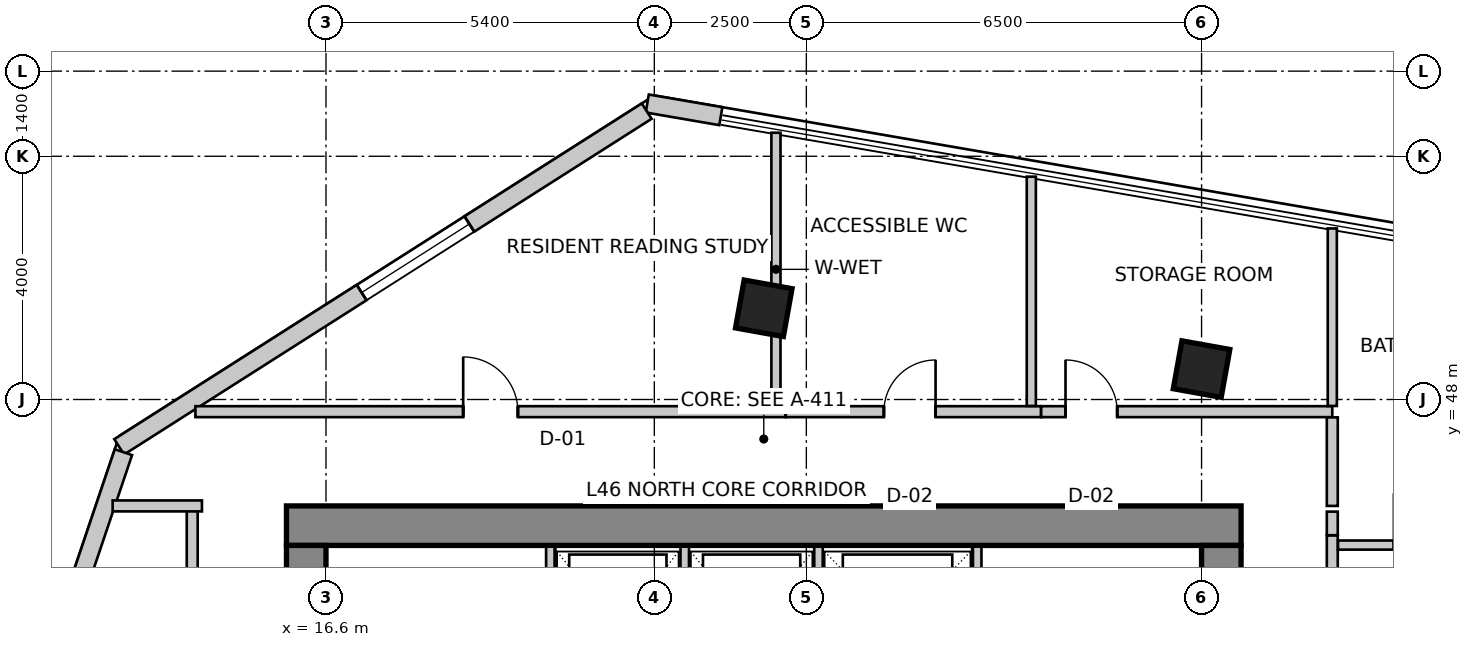
"""IFC4 building model, lengths in metres.
Left out: names, types, materials, properties, quantities, classifications, styles, units other than length and angle.
Written with IfcOpenShell. Run it as: python <this file> out.ifc"""

import sys

from ifc_helpers import new_model, si_unit, direction, frame, frame_2d, origin, origin_2d, place, context, subcontext, project, spatial, rectangle, extrude, source, transform, mapped, element, fill, save


model = new_model("IFC4")
c1 = context("Model", 3, precision=1e-05, world=origin(), true_north=direction((0.0, 1.0)))
c2 = subcontext(c1, "Body", "Model", "MODEL_VIEW")
j1 = project(units=[si_unit("LENGTHUNIT", "METRE"), si_unit("PLANEANGLEUNIT", "RADIAN")], contexts=[c1])
p1 = place(None, origin())
s1 = spatial("IfcSite", under=j1, at=p1, CompositionType="ELEMENT")
p2 = place(p1, origin())
s2 = spatial("IfcBuilding", under=s1, at=p2, CompositionType="ELEMENT")
p3 = place(p2, frame((0.0, 0.0, 186.9)))
s3 = spatial("IfcBuildingStorey", under=s2, at=p3, CompositionType="ELEMENT", Elevation=186.9)
p4 = place(p3, frame((15.95, 45.925, 0.0), z_axis=(0.0, 0.0, 1.0), x_axis=(1.0, 0.0, 0.0)))
e1 = element("IfcWall", 1, at=p4, inside=s3, PredefinedType="SHEAR", context=c2, shape_type="SweptSolid", body=[
    extrude(rectangle(XDim=15.7, YDim=0.65, at=frame_2d((7.85, 0.0))), origin(), (0.0, 0.0, 1.0), 3.5),
])
p5 = place(p3, frame((16.275, 34.2, 0.0), z_axis=(0.0, 0.0, 1.0), x_axis=(0.0, 1.0, 0.0)))
e2 = element("IfcWall", 2, at=p5, inside=s3, PredefinedType="SHEAR", context=c2, shape_type="SweptSolid", body=[
    extrude(rectangle(XDim=11.4, YDim=0.65, at=frame_2d((5.7, 0.0))), origin(), (0.0, 0.0, 1.0), 3.5),
])
m1 = source(origin(), c2, "Body", "SweptSolid", [
    extrude(rectangle(XDim=1.1, YDim=2.15, at=frame_2d((0.55, 1.075))), frame((0.0, 0.335, 0.0), z_axis=(0.0, -1.0, 0.0), x_axis=(1.0, 0.0, 0.0)), (0.0, 0.0, 1.0), 0.67),
])
p6 = place(p5, frame((7.15, 0.0, 0.0)))
e3 = element("IfcOpeningElement", 3, at=p6, cuts=e2, PredefinedType="OPENING", context=c2, shape_type="MappedRepresentation", body=[
    mapped(m1, transform((0.0, 0.0, 0.0), scale=1.0)),
])
p7 = place(p3, frame((31.325, 34.2, 0.0), z_axis=(0.0, 0.0, 1.0), x_axis=(0.0, 1.0, 0.0)))
e4 = element("IfcWall", 4, at=p7, inside=s3, PredefinedType="SHEAR", context=c2, shape_type="SweptSolid", body=[
    extrude(rectangle(XDim=11.4, YDim=0.65, at=frame_2d((5.7, 0.0))), origin(), (0.0, 0.0, 1.0), 3.5),
])
p8 = place(p7, frame((7.35, 0.0, 0.0)))
e5 = element("IfcOpeningElement", 5, at=p8, cuts=e4, PredefinedType="OPENING", context=c2, shape_type="MappedRepresentation", body=[
    mapped(m1, transform((0.0, 0.0, 0.0), scale=1.0)),
])
m2 = source(origin(), c2, "Body", "SweptSolid", [
    extrude(rectangle(XDim=0.8, YDim=0.8, at=origin_2d()), origin(), (0.0, 0.0, 1.0), 3.5),
])
for number, where, z_axis, x_axis in (
    (6, (23.8, 49.5, 0.0), (0.0, 0.0, 1.0), (0.984, -0.177, 0.0)),
    (7, (31.0, 48.5, 0.0), (0.0, 0.0, 1.0), (0.984, -0.177, 0.0)),
):
    element("IfcColumn", number, at=place(p3, frame(where, z_axis=z_axis, x_axis=x_axis)), inside=s3, PredefinedType="COLUMN", context=c2, shape_type="MappedRepresentation", body=[
        mapped(m2, transform((0.0, 0.0, 0.0), scale=1.0)),
    ])
p9 = place(p3, frame((23.094, 52.66, 0.0), z_axis=(0.0, 0.0, 1.0), x_axis=(-0.985503719785, 0.169653818966, 0.0)))
e8 = element("IfcWall", 8, at=p9, inside=s3, PredefinedType="SOLIDWALL", context=c2, shape_type="SweptSolid", body=[
    extrude(rectangle(XDim=1.228, YDim=0.3, at=frame_2d((0.614, 0.0))), origin(), (0.0, 0.0, 1.0), 3.25),
])
p10 = place(p3, frame((21.875, 52.742, 0.0), z_axis=(0.0, 0.0, 1.0), x_axis=(-0.843666375448, -0.536867811419, 0.0)))
e9 = element("IfcWall", 9, at=p10, inside=s3, PredefinedType="SOLIDWALL", context=c2, shape_type="SweptSolid", body=[
    extrude(rectangle(XDim=10.284, YDim=0.3, at=frame_2d((5.142, 0.0))), origin(), (0.0, 0.0, 1.0), 3.25),
])
m3 = source(origin(), c2, "Body", "SweptSolid", [
    extrude(rectangle(XDim=2.1, YDim=2.0, at=frame_2d((1.05, 1.0))), frame((0.0, 0.16, 0.0), z_axis=(0.0, -1.0, 0.0), x_axis=(1.0, 0.0, 0.0)), (0.0, 0.0, 1.0), 0.32),
])
p11 = place(p10, frame((3.457, 0.0, 0.85)))
e10 = element("IfcOpeningElement", 10, at=p11, cuts=e9, PredefinedType="OPENING", context=c2, shape_type="MappedRepresentation", body=[
    mapped(m3, transform((0.0, 0.0, 0.0), scale=1.0)),
])
p12 = place(p3, frame((13.269, 47.134, 0.0), z_axis=(0.0, 0.0, 1.0), x_axis=(-0.319920776449, -0.947444297464, 0.0)))
e11 = element("IfcWall", 11, at=p12, inside=s3, PredefinedType="SOLIDWALL", context=c2, shape_type="SweptSolid", body=[
    extrude(rectangle(XDim=16.133, YDim=0.3, at=frame_2d((8.067, 0.0))), origin(), (0.0, 0.0, 1.0), 3.25),
])
m4 = source(origin(), c2, "Body", "SweptSolid", [
    extrude(rectangle(XDim=2.4, YDim=2.2, at=frame_2d((1.2, 1.1))), frame((0.0, 0.16, 0.0), z_axis=(0.0, -1.0, 0.0), x_axis=(1.0, 0.0, 0.0)), (0.0, 0.0, 1.0), 0.32),
])
p13 = place(p12, frame((2.363, 0.0, 0.85)))
e12 = element("IfcOpeningElement", 12, at=p13, cuts=e11, PredefinedType="OPENING", context=c2, shape_type="MappedRepresentation", body=[
    mapped(m4, transform((0.0, 0.0, 0.0), scale=1.0)),
])
p14 = place(p12, frame((7.41, 0.0, 0.85)))
e13 = element("IfcOpeningElement", 13, at=p14, cuts=e11, PredefinedType="OPENING", context=c2, shape_type="MappedRepresentation", body=[
    mapped(m3, transform((0.0, 0.0, 0.0), scale=1.0)),
])
p15 = place(p12, frame((12.157, 0.0, 0.85)))
e14 = element("IfcOpeningElement", 14, at=p15, cuts=e11, PredefinedType="OPENING", context=c2, shape_type="MappedRepresentation", body=[
    mapped(m4, transform((0.0, 0.0, 0.0), scale=1.0)),
])
for number, where, z_axis, x_axis in (
    (15, (20.29, 43.28, 0.0), (0.0, 0.0, 1.0), (0.0, 1.0, 0.0)),
    (16, (27.31, 43.28, 0.0), (0.0, 0.0, 1.0), (0.0, 1.0, 0.0)),
):
    element("IfcWall", number, at=place(p3, frame(where, z_axis=z_axis, x_axis=x_axis)), inside=s3, PredefinedType="SOLIDWALL", context=c2, shape_type="SweptSolid", body=[
        extrude(rectangle(XDim=2.3, YDim=0.14, at=frame_2d((1.15, 0.0))), origin(), (0.0, 0.0, 1.0), 3.25),
    ])
for number, where, z_axis, x_axis in (
    (17, (22.5, 43.02, 0.0), (0.0, 0.0, 1.0), (0.0, 1.0, 0.0)),
    (18, (24.7, 43.02, 0.0), (0.0, 0.0, 1.0), (0.0, 1.0, 0.0)),
):
    element("IfcWall", number, at=place(p3, frame(where, z_axis=z_axis, x_axis=x_axis)), inside=s3, PredefinedType="SOLIDWALL", context=c2, shape_type="SweptSolid", body=[
        extrude(rectangle(XDim=2.56, YDim=0.14, at=frame_2d((1.28, 0.0))), origin(), (0.0, 0.0, 1.0), 3.25),
    ])
p16 = place(p3, frame((14.4, 33.644, 0.0), z_axis=(0.0, 0.0, 1.0), x_axis=(0.0, 1.0, 0.0)))
e19 = element("IfcWall", 19, at=p16, inside=s3, PredefinedType="PARTITIONING", context=c2, shape_type="SweptSolid", body=[
    extrude(rectangle(XDim=12.606, YDim=0.18, at=frame_2d((6.303, 0.0))), origin(), (0.0, 0.0, 1.0), 3.25),
])
m5 = source(origin(), c2, "Body", "SweptSolid", [
    extrude(rectangle(XDim=0.9, YDim=2.15, at=frame_2d((0.45, 1.075))), frame((0.0, 0.1, 0.0), z_axis=(0.0, -1.0, 0.0), x_axis=(1.0, 0.0, 0.0)), (0.0, 0.0, 1.0), 0.2),
])
p17 = place(p16, frame((4.399, 0.0, 0.0)))
e20 = element("IfcOpeningElement", 20, at=p17, cuts=e19, PredefinedType="OPENING", context=c2, shape_type="MappedRepresentation", body=[
    mapped(m5, transform((0.0, 0.0, 0.0), scale=1.0)),
])
p18 = place(p3, frame((14.56, 46.25, 0.0), z_axis=(0.0, 0.0, 1.0), x_axis=(-1.0, 0.0, 0.0)))
e21 = element("IfcWall", 21, at=p18, inside=s3, PredefinedType="PARTITIONING", context=c2, shape_type="SweptSolid", body=[
    extrude(rectangle(XDim=1.469, YDim=0.18, at=frame_2d((0.734, 0.0))), origin(), (0.0, 0.0, 1.0), 3.25),
])
p19 = place(p3, frame((14.453, 47.8, 0.0), z_axis=(0.0, 0.0, 1.0), x_axis=(1.0, 0.0, 0.0)))
e22 = element("IfcWall", 22, at=p19, inside=s3, PredefinedType="PARTITIONING", context=c2, shape_type="SweptSolid", body=[
    extrude(rectangle(XDim=9.707, YDim=0.18, at=frame_2d((4.854, 0.0))), origin(), (0.0, 0.0, 1.0), 2.919),
])
p20 = place(p19, frame((4.404, 0.0, 0.0)))
e23 = element("IfcOpeningElement", 23, at=p20, cuts=e22, PredefinedType="OPENING", context=c2, shape_type="MappedRepresentation", body=[
    mapped(m5, transform((0.0, 0.0, 0.0), scale=1.0)),
])
p21 = place(p3, frame((24.162, 47.8, 0.0), z_axis=(0.0, 0.0, 1.0), x_axis=(1.0, 0.0, 0.0)))
e24 = element("IfcWall", 24, at=p21, inside=s3, PredefinedType="PARTITIONING", context=c2, shape_type="SweptSolid", body=[
    extrude(rectangle(XDim=4.198, YDim=0.18, at=frame_2d((2.099, 0.0))), origin(), (0.0, 0.0, 1.0), 3.25),
])
m6 = source(origin(), c2, "Body", "SweptSolid", [
    extrude(rectangle(XDim=0.85, YDim=2.15, at=frame_2d((0.425, 1.075))), frame((0.0, 0.1, 0.0), z_axis=(0.0, -1.0, 0.0), x_axis=(1.0, 0.0, 0.0)), (0.0, 0.0, 1.0), 0.2),
])
p22 = place(p21, frame((1.613, 0.0, 0.0)))
e25 = element("IfcOpeningElement", 25, at=p22, cuts=e24, PredefinedType="OPENING", context=c2, shape_type="MappedRepresentation", body=[
    mapped(m6, transform((0.0, 0.0, 0.0), scale=1.0)),
])
p23 = place(p3, frame((28.362, 47.8, 0.0), z_axis=(0.0, 0.0, 1.0), x_axis=(1.0, 0.0, 0.0)))
e26 = element("IfcWall", 26, at=p23, inside=s3, PredefinedType="PARTITIONING", context=c2, shape_type="SweptSolid", body=[
    extrude(rectangle(XDim=4.788, YDim=0.18, at=frame_2d((2.394, 0.0))), origin(), (0.0, 0.0, 1.0), 2.779),
])
p24 = place(p23, frame((0.401, 0.0, 0.0)))
e27 = element("IfcOpeningElement", 27, at=p24, cuts=e26, PredefinedType="OPENING", context=c2, shape_type="MappedRepresentation", body=[
    mapped(m6, transform((0.0, 0.0, 0.0), scale=1.0)),
])
p25 = place(p3, frame((33.15, 47.706, 0.0), z_axis=(0.0, 0.0, 1.0), x_axis=(0.0, -1.0, 0.0)))
e28 = element("IfcWall", 28, at=p25, inside=s3, PredefinedType="PARTITIONING", context=c2, shape_type="SweptSolid", body=[
    extrude(rectangle(XDim=1.456, YDim=0.18, at=frame_2d((0.728, 0.0))), origin(), (0.0, 0.0, 1.0), 2.779),
])
p26 = place(p3, frame((33.15, 45.766, 0.0), z_axis=(0.0, 0.0, 1.0), x_axis=(0.0, -1.0, 0.0)))
e29 = element("IfcWall", 29, at=p26, inside=s3, PredefinedType="PARTITIONING", context=c2, shape_type="SweptSolid", body=[
    extrude(rectangle(XDim=5.526, YDim=0.18, at=frame_2d((2.763, 0.0))), origin(), (0.0, 0.0, 1.0), 2.779),
])
p27 = place(p3, frame((33.15, 46.156, 0.0), z_axis=(0.0, 0.0, 1.0), x_axis=(0.0, -1.0, 0.0)))
e30 = element("IfcWall", 30, at=p27, inside=s3, PredefinedType="PARTITIONING", context=c2, shape_type="SweptSolid", body=[
    extrude(rectangle(XDim=0.388, YDim=0.18, at=frame_2d((0.194, 0.0))), origin(), (0.0, 0.0, 1.0), 2.919),
])
p28 = place(p3, frame((24.0, 52.387, 0.0), z_axis=(0.0, 0.0, 1.0), x_axis=(0.0, -1.0, 0.0)))
e31 = element("IfcWall", 31, at=p28, inside=s3, PredefinedType="PARTITIONING", context=c2, shape_type="SweptSolid", body=[
    extrude(rectangle(XDim=4.493, YDim=0.15, at=frame_2d((2.247, 0.0))), origin(), (0.0, 0.0, 1.0), 2.542),
])
p29 = place(p3, frame((28.2, 51.665, 0.0), z_axis=(0.0, 0.0, 1.0), x_axis=(0.0, -1.0, 0.0)))
e32 = element("IfcWall", 32, at=p29, inside=s3, PredefinedType="PARTITIONING", context=c2, shape_type="SweptSolid", body=[
    extrude(rectangle(XDim=3.771, YDim=0.15, at=frame_2d((1.885, 0.0))), origin(), (0.0, 0.0, 1.0), 2.542),
])
p30 = place(p3, frame((33.15, 50.813, 0.0), z_axis=(0.0, 0.0, 1.0), x_axis=(0.0, -1.0, 0.0)))
e33 = element("IfcWall", 33, at=p30, inside=s3, PredefinedType="PARTITIONING", context=c2, shape_type="SweptSolid", body=[
    extrude(rectangle(XDim=2.919, YDim=0.15, at=frame_2d((1.459, 0.0))), origin(), (0.0, 0.0, 1.0), 2.542),
])
p31 = place(p3, frame((33.244, 45.606, 0.0), z_axis=(0.0, 0.0, 1.0), x_axis=(1.0, 0.0, 0.0)))
e34 = element("IfcWall", 34, at=p31, inside=s3, PredefinedType="PARTITIONING", context=c2, shape_type="SweptSolid", body=[
    extrude(rectangle(XDim=2.816, YDim=0.15, at=frame_2d((1.408, 0.0))), origin(), (0.0, 0.0, 1.0), 2.779),
])
m7 = source(origin(), c2, "Body", "SweptSolid", [
    extrude(rectangle(XDim=0.85, YDim=2.15, at=frame_2d((0.425, 1.075))), frame((0.0, 0.085, 0.0), z_axis=(0.0, -1.0, 0.0), x_axis=(1.0, 0.0, 0.0)), (0.0, 0.0, 1.0), 0.17),
])
p32 = place(p31, frame((0.919, 0.0, 0.0)))
e35 = element("IfcOpeningElement", 35, at=p32, cuts=e34, PredefinedType="OPENING", context=c2, shape_type="MappedRepresentation", body=[
    mapped(m7, transform((0.0, 0.0, 0.0), scale=1.0)),
])
m8 = source(origin(), c2, "Body", "SweptSolid", [
    extrude(rectangle(XDim=2.1, YDim=2.0, at=frame_2d((1.05, 1.0))), frame((0.0, -0.015, 0.0), z_axis=(0.0, -1.0, 0.0), x_axis=(1.0, 0.0, 0.0)), (0.0, 0.0, 1.0), 0.06),
])
p33 = place(p11, origin())
e36 = element("IfcWindow", 36, at=p33, inside=s3, PartitioningType="SINGLE_PANEL", PredefinedType="WINDOW", context=c2, shape_type="MappedRepresentation", body=[
    mapped(m8, transform((0.0, 0.0, 0.0), scale=1.0)),
])
fill(e10, e36)
m9 = source(origin(), c2, "Body", "SweptSolid", [
    extrude(rectangle(XDim=0.9, YDim=2.15, at=frame_2d((0.45, 1.075))), frame((0.0, 0.025, 0.0), z_axis=(0.0, -1.0, 0.0), x_axis=(1.0, 0.0, 0.0)), (0.0, 0.0, 1.0), 0.05),
])
p34 = place(p20, origin())
e37 = element("IfcDoor", 37, at=p34, inside=s3, OperationType="SINGLE_SWING_LEFT", PredefinedType="DOOR", context=c2, shape_type="MappedRepresentation", body=[
    mapped(m9, transform((0.0, 0.0, 0.0), scale=1.0)),
])
fill(e23, e37)
m10 = source(origin(), c2, "Body", "SweptSolid", [
    extrude(rectangle(XDim=0.85, YDim=2.15, at=frame_2d((0.425, 1.075))), frame((0.0, 0.025, 0.0), z_axis=(0.0, -1.0, 0.0), x_axis=(1.0, 0.0, 0.0)), (0.0, 0.0, 1.0), 0.05),
])
p35 = place(p22, origin())
e38 = element("IfcDoor", 38, at=p35, inside=s3, OperationType="SINGLE_SWING_RIGHT", PredefinedType="DOOR", context=c2, shape_type="MappedRepresentation", body=[
    mapped(m10, transform((0.0, 0.0, 0.0), scale=1.0)),
])
fill(e25, e38)
p36 = place(p24, origin())
e39 = element("IfcDoor", 39, at=p36, inside=s3, OperationType="SINGLE_SWING_LEFT", PredefinedType="DOOR", context=c2, shape_type="MappedRepresentation", body=[
    mapped(m10, transform((0.0, 0.0, 0.0), scale=1.0)),
])
fill(e27, e39)
save(model, sys.argv[1])
